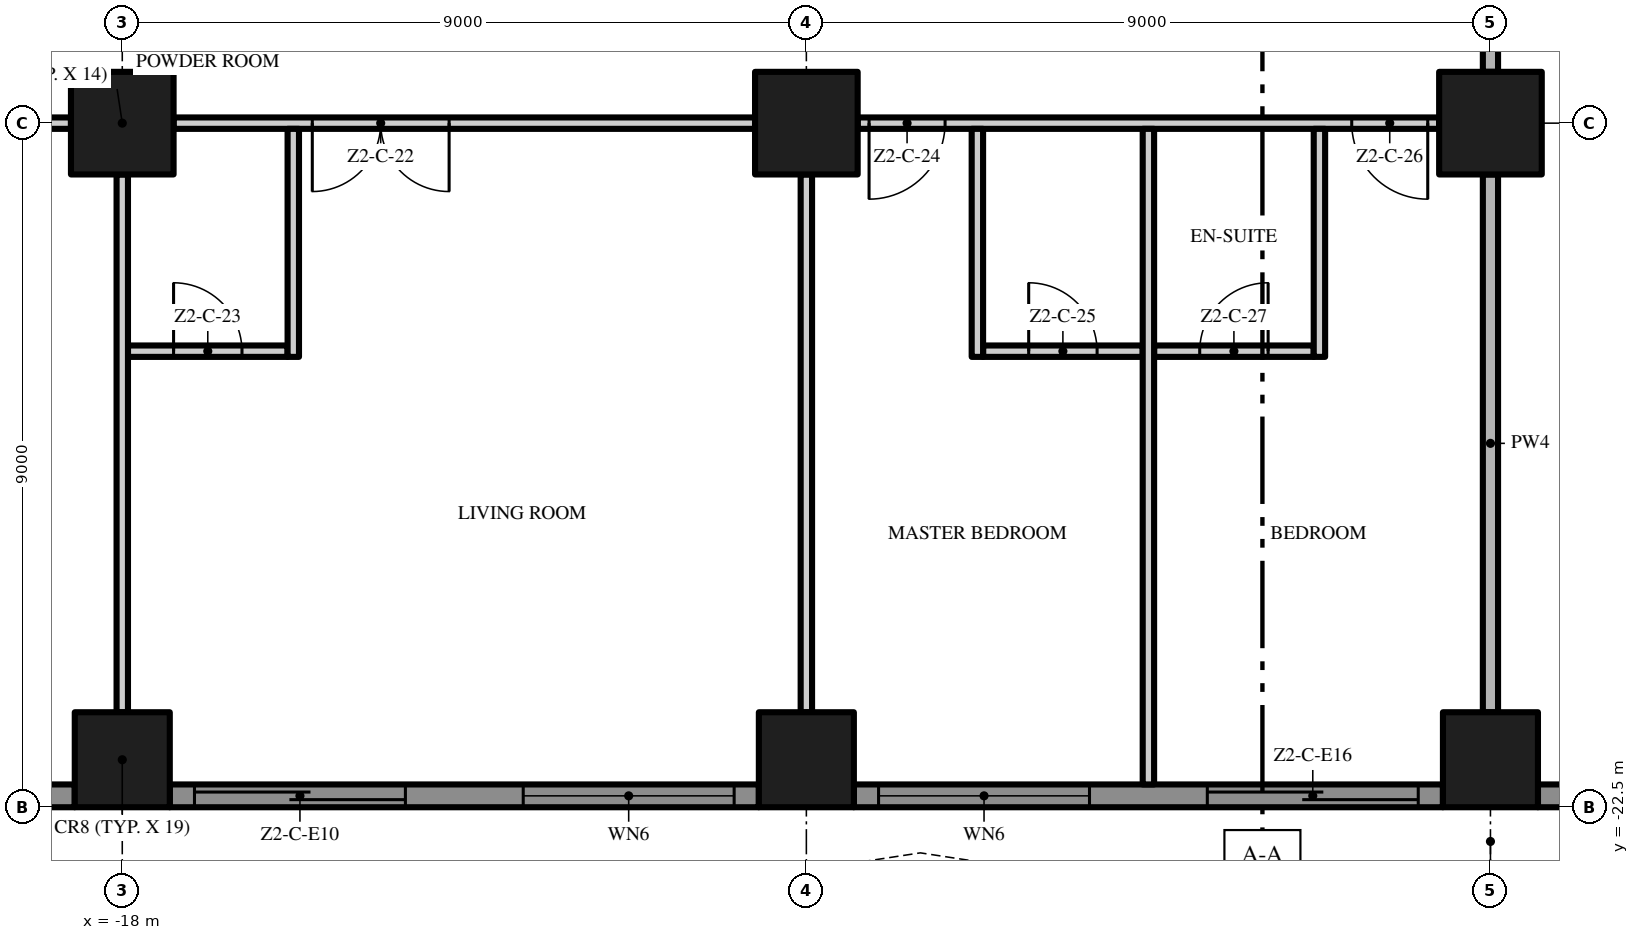
"""IFC4 building model, lengths in metres.
Left out: names, types, materials, properties, quantities, classifications, styles, units other than length and angle.
Written with IfcOpenShell. Run it as: python <this file> out.ifc"""

import sys

from ifc_helpers import new_model, si_unit, direction, frame, frame_2d, origin, origin_2d, place, context, subcontext, project, spatial, polyline, rectangle, outline, extrude, element, fill, save


model = new_model("IFC4")
c1 = context("Model", 3, precision=1e-05, world=origin(), true_north=direction((0.0, 1.0)))
c2 = subcontext(c1, "Body", "Model", "MODEL_VIEW")
j1 = project(units=[si_unit("LENGTHUNIT", "METRE"), si_unit("PLANEANGLEUNIT", "RADIAN")], contexts=[c1])
p1 = place(None, origin())
s1 = spatial("IfcSite", under=j1, at=p1, CompositionType="ELEMENT")
p2 = place(p1, origin())
s2 = spatial("IfcBuilding", under=s1, at=p2, CompositionType="ELEMENT")
p3 = place(p2, frame((0.0, 0.0, 99.8)))
s3 = spatial("IfcBuildingStorey", under=s2, at=p3, CompositionType="ELEMENT", Elevation=99.8)
p4 = place(p3, frame((-18.0, -13.5, 0.0), z_axis=(0.0, 0.0, 1.0), x_axis=(1.0, 0.0, 0.0)))
e1 = element("IfcColumn", 1, at=p4, inside=s3, PredefinedType="COLUMN", context=c2, shape_type="SweptSolid", body=[
    extrude(rectangle(XDim=1.35, YDim=1.35, at=origin_2d()), origin(), (0.0, 0.0, 1.0), 3.5),
])
p5 = place(p3, frame((-18.0, -21.875, 0.0), z_axis=(0.0, 0.0, 1.0), x_axis=(1.0, 0.0, 0.0)))
e2 = element("IfcColumn", 2, at=p5, inside=s3, PredefinedType="COLUMN", context=c2, shape_type="SweptSolid", body=[
    extrude(rectangle(XDim=1.25, YDim=1.25, at=origin_2d()), origin(), (0.0, 0.0, 1.0), 3.5),
])
p6 = place(p3, frame((-9.0, -13.5, 0.0), z_axis=(0.0, 0.0, 1.0), x_axis=(1.0, 0.0, 0.0)))
e3 = element("IfcColumn", 3, at=p6, inside=s3, PredefinedType="COLUMN", context=c2, shape_type="SweptSolid", body=[
    extrude(rectangle(XDim=1.35, YDim=1.35, at=origin_2d()), origin(), (0.0, 0.0, 1.0), 3.5),
])
p7 = place(p3, frame((-9.0, -21.875, 0.0), z_axis=(0.0, 0.0, 1.0), x_axis=(1.0, 0.0, 0.0)))
e4 = element("IfcColumn", 4, at=p7, inside=s3, PredefinedType="COLUMN", context=c2, shape_type="SweptSolid", body=[
    extrude(rectangle(XDim=1.25, YDim=1.25, at=origin_2d()), origin(), (0.0, 0.0, 1.0), 3.5),
])
p8 = place(p3, frame((0.0, -13.5, 0.0), z_axis=(0.0, 0.0, 1.0), x_axis=(1.0, 0.0, 0.0)))
e5 = element("IfcColumn", 5, at=p8, inside=s3, PredefinedType="COLUMN", context=c2, shape_type="SweptSolid", body=[
    extrude(rectangle(XDim=1.35, YDim=1.35, at=origin_2d()), origin(), (0.0, 0.0, 1.0), 3.5),
])
p9 = place(p3, frame((0.0, -21.875, 0.0), z_axis=(0.0, 0.0, 1.0), x_axis=(1.0, 0.0, 0.0)))
e6 = element("IfcColumn", 6, at=p9, inside=s3, PredefinedType="COLUMN", context=c2, shape_type="SweptSolid", body=[
    extrude(rectangle(XDim=1.25, YDim=1.25, at=origin_2d()), origin(), (0.0, 0.0, 1.0), 3.5),
])
p10 = place(p3, frame((-18.625, -22.35, 0.0), z_axis=(0.0, 0.0, 1.0), x_axis=(-1.0, 0.0, 0.0)))
e7 = element("IfcWall", 7, at=p10, inside=s3, PredefinedType="SOLIDWALL", context=c2, shape_type="SweptSolid", body=[
    extrude(rectangle(XDim=3.575, YDim=0.3, at=frame_2d((1.788, 0.0))), origin(), (0.0, 0.0, 1.0), 3.5),
])
p11 = place(p10, frame((0.325, 0.0, 0.45)))
e8 = element("IfcOpeningElement", 8, at=p11, cuts=e7, PredefinedType="OPENING", context=c2, shape_type="SweptSolid", body=[
    extrude(rectangle(XDim=2.775, YDim=2.65, at=frame_2d((1.387, 1.325))), frame((0.0, 0.16, 0.0), z_axis=(0.0, -1.0, 0.0), x_axis=(1.0, 0.0, 0.0)), (0.0, 0.0, 1.0), 0.32),
])
p12 = place(p3, frame((-9.625, -22.35, 0.0), z_axis=(0.0, 0.0, 1.0), x_axis=(-1.0, 0.0, 0.0)))
e9 = element("IfcWall", 9, at=p12, inside=s3, PredefinedType="SOLIDWALL", context=c2, shape_type="SweptSolid", body=[
    extrude(rectangle(XDim=7.75, YDim=0.3, at=frame_2d((3.875, 0.0))), origin(), (0.0, 0.0, 1.0), 3.5),
])
p13 = place(p12, frame((4.65, 0.0, 0.0)))
e10 = element("IfcOpeningElement", 10, at=p13, cuts=e9, PredefinedType="OPENING", context=c2, shape_type="SweptSolid", body=[
    extrude(rectangle(XDim=2.775, YDim=2.4, at=frame_2d((1.387, 1.2))), frame((0.0, 0.16, 0.0), z_axis=(0.0, -1.0, 0.0), x_axis=(1.0, 0.0, 0.0)), (0.0, 0.0, 1.0), 0.32),
])
p14 = place(p12, frame((0.325, 0.0, 0.45)))
e11 = element("IfcOpeningElement", 11, at=p14, cuts=e9, PredefinedType="OPENING", context=c2, shape_type="SweptSolid", body=[
    extrude(rectangle(XDim=2.775, YDim=2.65, at=frame_2d((1.387, 1.325))), frame((0.0, 0.16, 0.0), z_axis=(0.0, -1.0, 0.0), x_axis=(1.0, 0.0, 0.0)), (0.0, 0.0, 1.0), 0.32),
])
p15 = place(p3, frame((-0.625, -22.35, 0.0), z_axis=(0.0, 0.0, 1.0), x_axis=(-1.0, 0.0, 0.0)))
e12 = element("IfcWall", 12, at=p15, inside=s3, PredefinedType="SOLIDWALL", context=c2, shape_type="SweptSolid", body=[
    extrude(rectangle(XDim=7.75, YDim=0.3, at=frame_2d((3.875, 0.0))), origin(), (0.0, 0.0, 1.0), 3.5),
])
p16 = place(p15, frame((4.65, 0.0, 0.45)))
e13 = element("IfcOpeningElement", 13, at=p16, cuts=e12, PredefinedType="OPENING", context=c2, shape_type="SweptSolid", body=[
    extrude(rectangle(XDim=2.775, YDim=2.65, at=frame_2d((1.387, 1.325))), frame((0.0, 0.16, 0.0), z_axis=(0.0, -1.0, 0.0), x_axis=(1.0, 0.0, 0.0)), (0.0, 0.0, 1.0), 0.32),
])
p17 = place(p15, frame((0.325, 0.0, 0.0)))
e14 = element("IfcOpeningElement", 14, at=p17, cuts=e12, PredefinedType="OPENING", context=c2, shape_type="SweptSolid", body=[
    extrude(rectangle(XDim=2.775, YDim=2.4, at=frame_2d((1.387, 1.2))), frame((0.0, 0.16, 0.0), z_axis=(0.0, -1.0, 0.0), x_axis=(1.0, 0.0, 0.0)), (0.0, 0.0, 1.0), 0.32),
])
p18 = place(p3, frame((8.375, -22.35, 0.0), z_axis=(0.0, 0.0, 1.0), x_axis=(-1.0, 0.0, 0.0)))
e15 = element("IfcWall", 15, at=p18, inside=s3, PredefinedType="SOLIDWALL", context=c2, shape_type="SweptSolid", body=[
    extrude(rectangle(XDim=7.75, YDim=0.3, at=frame_2d((3.875, 0.0))), origin(), (0.0, 0.0, 1.0), 3.5),
])
p19 = place(p18, frame((4.65, 0.0, 0.0)))
e16 = element("IfcOpeningElement", 16, at=p19, cuts=e15, PredefinedType="OPENING", context=c2, shape_type="SweptSolid", body=[
    extrude(rectangle(XDim=2.775, YDim=2.4, at=frame_2d((1.387, 1.2))), frame((0.0, 0.16, 0.0), z_axis=(0.0, -1.0, 0.0), x_axis=(1.0, 0.0, 0.0)), (0.0, 0.0, 1.0), 0.32),
])
p20 = place(p18, frame((0.325, 0.0, 0.45)))
e17 = element("IfcOpeningElement", 17, at=p20, cuts=e15, PredefinedType="OPENING", context=c2, shape_type="SweptSolid", body=[
    extrude(rectangle(XDim=2.775, YDim=2.65, at=frame_2d((1.387, 1.325))), frame((0.0, 0.16, 0.0), z_axis=(0.0, -1.0, 0.0), x_axis=(1.0, 0.0, 0.0)), (0.0, 0.0, 1.0), 0.32),
])
p21 = place(p3, origin())
e18 = element("IfcWall", 18, at=p21, inside=s3, PredefinedType="USERDEFINED", context=c2, shape_type="SweptSolid", body=[
    extrude(outline(polyline([(-22.5, -23.1), (-21.0, -23.329), (-19.5, -23.929), (-18.0, -24.671), (-16.5, -25.271), (-15.0, -25.5), (-13.5, -25.271), (-12.0, -24.671), (-10.5, -23.929), (-9.0, -23.329), (-7.5, -23.1), (-6.0, -23.329), (-4.5, -23.929), (-3.0, -24.671), (-1.5, -25.271), (0.0, -25.5), (1.5, -25.271), (3.0, -24.671), (4.5, -23.929), (6.0, -23.329), (7.5, -23.1), (9.0, -23.329), (10.5, -23.929), (12.0, -24.671), (13.5, -25.271), (15.0, -25.5), (16.5, -25.271), (18.0, -24.671), (19.5, -23.929), (21.0, -23.329), (22.5, -23.1), (22.462, -22.853), (20.934, -23.086), (19.398, -23.701), (17.898, -24.442), (16.434, -25.028), (15.0, -25.247), (13.566, -25.028), (12.102, -24.442), (10.602, -23.701), (9.066, -23.086), (7.5, -22.847), (5.934, -23.086), (4.398, -23.701), (2.898, -24.442), (1.434, -25.028), (0.0, -25.247), (-1.434, -25.028), (-2.898, -24.442), (-4.398, -23.701), (-5.934, -23.086), (-7.5, -22.847), (-9.066, -23.086), (-10.602, -23.701), (-12.102, -24.442), (-13.566, -25.028), (-15.0, -25.247), (-16.434, -25.028), (-17.898, -24.442), (-19.398, -23.701), (-20.934, -23.086), (-22.462, -22.853), (-22.5, -23.1)])), origin(), (0.0, 0.0, 1.0), 0.9),
])
p22 = place(p3, frame((-17.925, -16.5, 0.0), z_axis=(0.0, 0.0, 1.0), x_axis=(1.0, 0.0, 0.0)))
e19 = element("IfcWall", 19, at=p22, inside=s3, PredefinedType="PARTITIONING", context=c2, shape_type="SweptSolid", body=[
    extrude(rectangle(XDim=2.1, YDim=0.15, at=frame_2d((1.05, 0.0))), origin(), (0.0, 0.0, 1.0), 3.5),
])
p23 = place(p22, frame((0.6, 0.0, 0.0)))
e20 = element("IfcOpeningElement", 20, at=p23, cuts=e19, PredefinedType="OPENING", context=c2, shape_type="SweptSolid", body=[
    extrude(rectangle(XDim=0.9, YDim=2.1, at=frame_2d((0.45, 1.05))), frame((0.0, 0.085, 0.0), z_axis=(0.0, -1.0, 0.0), x_axis=(1.0, 0.0, 0.0)), (0.0, 0.0, 1.0), 0.17),
])
p24 = place(p3, frame((-6.675, -16.5, 0.0), z_axis=(0.0, 0.0, 1.0), x_axis=(1.0, 0.0, 0.0)))
e21 = element("IfcWall", 21, at=p24, inside=s3, PredefinedType="PARTITIONING", context=c2, shape_type="SweptSolid", body=[
    extrude(rectangle(XDim=2.1, YDim=0.15, at=frame_2d((1.05, 0.0))), origin(), (0.0, 0.0, 1.0), 3.5),
])
p25 = place(p24, frame((0.6, 0.0, 0.0)))
e22 = element("IfcOpeningElement", 22, at=p25, cuts=e21, PredefinedType="OPENING", context=c2, shape_type="SweptSolid", body=[
    extrude(rectangle(XDim=0.9, YDim=2.1, at=frame_2d((0.45, 1.05))), frame((0.0, 0.085, 0.0), z_axis=(0.0, -1.0, 0.0), x_axis=(1.0, 0.0, 0.0)), (0.0, 0.0, 1.0), 0.17),
])
p26 = place(p3, frame((-4.425, -16.5, 0.0), z_axis=(0.0, 0.0, 1.0), x_axis=(1.0, 0.0, 0.0)))
e23 = element("IfcWall", 23, at=p26, inside=s3, PredefinedType="PARTITIONING", context=c2, shape_type="SweptSolid", body=[
    extrude(rectangle(XDim=2.1, YDim=0.15, at=frame_2d((1.05, 0.0))), origin(), (0.0, 0.0, 1.0), 3.5),
])
p27 = place(p26, frame((0.6, 0.0, 0.0)))
e24 = element("IfcOpeningElement", 24, at=p27, cuts=e23, PredefinedType="OPENING", context=c2, shape_type="SweptSolid", body=[
    extrude(rectangle(XDim=0.9, YDim=2.1, at=frame_2d((0.45, 1.05))), frame((0.0, 0.085, 0.0), z_axis=(0.0, -1.0, 0.0), x_axis=(1.0, 0.0, 0.0)), (0.0, 0.0, 1.0), 0.17),
])
p28 = place(p3, frame((-18.675, -13.5, 0.0), z_axis=(0.0, 0.0, 1.0), x_axis=(-1.0, 0.0, 0.0)))
e25 = element("IfcWall", 25, at=p28, inside=s3, PredefinedType="PARTITIONING", context=c2, shape_type="SweptSolid", body=[
    extrude(rectangle(XDim=7.075, YDim=0.15, at=frame_2d((3.538, 0.0))), origin(), (0.0, 0.0, 1.0), 3.5),
])
p29 = place(p28, frame((3.075, 0.0, 0.0)))
e26 = element("IfcOpeningElement", 26, at=p29, cuts=e25, PredefinedType="OPENING", context=c2, shape_type="SweptSolid", body=[
    extrude(rectangle(XDim=1.5, YDim=2.4, at=frame_2d((0.75, 1.2))), frame((0.0, 0.085, 0.0), z_axis=(0.0, -1.0, 0.0), x_axis=(1.0, 0.0, 0.0)), (0.0, 0.0, 1.0), 0.17),
])
p30 = place(p3, frame((-9.675, -13.5, 0.0), z_axis=(0.0, 0.0, 1.0), x_axis=(-1.0, 0.0, 0.0)))
e27 = element("IfcWall", 27, at=p30, inside=s3, PredefinedType="PARTITIONING", context=c2, shape_type="SweptSolid", body=[
    extrude(rectangle(XDim=7.65, YDim=0.15, at=frame_2d((3.825, 0.0))), origin(), (0.0, 0.0, 1.0), 3.5),
])
p31 = place(p30, frame((4.025, 0.0, 0.0)))
e28 = element("IfcOpeningElement", 28, at=p31, cuts=e27, PredefinedType="OPENING", context=c2, shape_type="SweptSolid", body=[
    extrude(rectangle(XDim=1.8, YDim=2.4, at=frame_2d((0.9, 1.2))), frame((0.0, 0.085, 0.0), z_axis=(0.0, -1.0, 0.0), x_axis=(1.0, 0.0, 0.0)), (0.0, 0.0, 1.0), 0.17),
])
p32 = place(p3, frame((-0.675, -13.5, 0.0), z_axis=(0.0, 0.0, 1.0), x_axis=(-1.0, 0.0, 0.0)))
e29 = element("IfcWall", 29, at=p32, inside=s3, PredefinedType="PARTITIONING", context=c2, shape_type="SweptSolid", body=[
    extrude(rectangle(XDim=7.65, YDim=0.15, at=frame_2d((3.825, 0.0))), origin(), (0.0, 0.0, 1.0), 3.5),
])
p33 = place(p32, frame((6.5, 0.0, 0.0)))
e30 = element("IfcOpeningElement", 30, at=p33, cuts=e29, PredefinedType="OPENING", context=c2, shape_type="SweptSolid", body=[
    extrude(rectangle(XDim=1.0, YDim=2.4, at=frame_2d((0.5, 1.2))), frame((0.0, 0.085, 0.0), z_axis=(0.0, -1.0, 0.0), x_axis=(1.0, 0.0, 0.0)), (0.0, 0.0, 1.0), 0.17),
])
p34 = place(p32, frame((0.15, 0.0, 0.0)))
e31 = element("IfcOpeningElement", 31, at=p34, cuts=e29, PredefinedType="OPENING", context=c2, shape_type="SweptSolid", body=[
    extrude(rectangle(XDim=1.0, YDim=2.4, at=frame_2d((0.5, 1.2))), frame((0.0, 0.085, 0.0), z_axis=(0.0, -1.0, 0.0), x_axis=(1.0, 0.0, 0.0)), (0.0, 0.0, 1.0), 0.17),
])
p35 = place(p3, frame((-18.0, -21.25, 0.0), z_axis=(0.0, 0.0, 1.0), x_axis=(0.0, 1.0, 0.0)))
e32 = element("IfcWall", 32, at=p35, inside=s3, PredefinedType="PARTITIONING", context=c2, shape_type="SweptSolid", body=[
    extrude(rectangle(XDim=7.075, YDim=0.15, at=frame_2d((3.538, 0.0))), origin(), (0.0, 0.0, 1.0), 3.5),
])
p36 = place(p3, frame((-15.75, -16.575, 0.0), z_axis=(0.0, 0.0, 1.0), x_axis=(0.0, 1.0, 0.0)))
e33 = element("IfcWall", 33, at=p36, inside=s3, PredefinedType="PARTITIONING", context=c2, shape_type="SweptSolid", body=[
    extrude(rectangle(XDim=3.0, YDim=0.15, at=frame_2d((1.5, 0.0))), origin(), (0.0, 0.0, 1.0), 3.5),
])
p37 = place(p3, frame((-9.0, -21.25, 0.0), z_axis=(0.0, 0.0, 1.0), x_axis=(0.0, 1.0, 0.0)))
e34 = element("IfcWall", 34, at=p37, inside=s3, PredefinedType="PARTITIONING", context=c2, shape_type="SweptSolid", body=[
    extrude(rectangle(XDim=7.075, YDim=0.15, at=frame_2d((3.538, 0.0))), origin(), (0.0, 0.0, 1.0), 3.5),
])
p38 = place(p3, frame((-6.75, -16.575, 0.0), z_axis=(0.0, 0.0, 1.0), x_axis=(0.0, 1.0, 0.0)))
e35 = element("IfcWall", 35, at=p38, inside=s3, PredefinedType="PARTITIONING", context=c2, shape_type="SweptSolid", body=[
    extrude(rectangle(XDim=3.0, YDim=0.15, at=frame_2d((1.5, 0.0))), origin(), (0.0, 0.0, 1.0), 3.5),
])
p39 = place(p3, frame((-4.5, -22.2, 0.0), z_axis=(0.0, 0.0, 1.0), x_axis=(0.0, 1.0, 0.0)))
e36 = element("IfcWall", 36, at=p39, inside=s3, PredefinedType="PARTITIONING", context=c2, shape_type="SweptSolid", body=[
    extrude(rectangle(XDim=8.625, YDim=0.15, at=frame_2d((4.312, 0.0))), origin(), (0.0, 0.0, 1.0), 3.5),
])
p40 = place(p3, frame((-2.25, -16.575, 0.0), z_axis=(0.0, 0.0, 1.0), x_axis=(0.0, 1.0, 0.0)))
e37 = element("IfcWall", 37, at=p40, inside=s3, PredefinedType="PARTITIONING", context=c2, shape_type="SweptSolid", body=[
    extrude(rectangle(XDim=3.0, YDim=0.15, at=frame_2d((1.5, 0.0))), origin(), (0.0, 0.0, 1.0), 3.5),
])
p41 = place(p3, frame((0.0, -21.25, 0.0), z_axis=(0.0, 0.0, 1.0), x_axis=(0.0, 1.0, 0.0)))
e38 = element("IfcWall", 38, at=p41, inside=s3, PredefinedType="PARTITIONING", context=c2, shape_type="SweptSolid", body=[
    extrude(rectangle(XDim=7.075, YDim=0.2, at=frame_2d((3.538, 0.0))), origin(), (0.0, 0.0, 1.0), 3.5),
])
p42 = place(p3, frame((0.0, -12.825, 0.0), z_axis=(0.0, 0.0, 1.0), x_axis=(0.0, 1.0, 0.0)))
e39 = element("IfcWall", 39, at=p42, inside=s3, PredefinedType="PARTITIONING", context=c2, shape_type="SweptSolid", body=[
    extrude(rectangle(XDim=7.65, YDim=0.2, at=frame_2d((3.825, 0.0))), origin(), (0.0, 0.0, 1.0), 3.5),
])
p43 = place(p13, origin())
e40 = element("IfcDoor", 40, at=p43, inside=s3, OperationType="SINGLE_SWING_LEFT", PredefinedType="DOOR", context=c2, shape_type="SweptSolid", body=[
    extrude(rectangle(XDim=2.775, YDim=2.4, at=frame_2d((1.387, 1.2))), frame((0.0, 0.025, 0.0), z_axis=(0.0, -1.0, 0.0), x_axis=(1.0, 0.0, 0.0)), (0.0, 0.0, 1.0), 0.05),
])
fill(e10, e40)
p44 = place(p14, origin())
e41 = element("IfcWindow", 41, at=p44, inside=s3, PartitioningType="SINGLE_PANEL", PredefinedType="WINDOW", context=c2, shape_type="SweptSolid", body=[
    extrude(rectangle(XDim=2.775, YDim=2.65, at=frame_2d((1.387, 1.325))), frame((0.0, 0.03, 0.0), z_axis=(0.0, -1.0, 0.0), x_axis=(1.0, 0.0, 0.0)), (0.0, 0.0, 1.0), 0.06),
])
fill(e11, e41)
p45 = place(p16, origin())
e42 = element("IfcWindow", 42, at=p45, inside=s3, PartitioningType="SINGLE_PANEL", PredefinedType="WINDOW", context=c2, shape_type="SweptSolid", body=[
    extrude(rectangle(XDim=2.775, YDim=2.65, at=frame_2d((1.387, 1.325))), frame((0.0, 0.03, 0.0), z_axis=(0.0, -1.0, 0.0), x_axis=(1.0, 0.0, 0.0)), (0.0, 0.0, 1.0), 0.06),
])
fill(e13, e42)
p46 = place(p17, origin())
e43 = element("IfcDoor", 43, at=p46, inside=s3, OperationType="SINGLE_SWING_LEFT", PredefinedType="DOOR", context=c2, shape_type="SweptSolid", body=[
    extrude(rectangle(XDim=2.775, YDim=2.4, at=frame_2d((1.387, 1.2))), frame((0.0, 0.025, 0.0), z_axis=(0.0, -1.0, 0.0), x_axis=(1.0, 0.0, 0.0)), (0.0, 0.0, 1.0), 0.05),
])
fill(e14, e43)
p47 = place(p31, origin())
e44 = element("IfcDoor", 44, at=p47, inside=s3, OperationType="DOUBLE_DOOR_SINGLE_SWING", PredefinedType="DOOR", context=c2, shape_type="SweptSolid", body=[
    extrude(rectangle(XDim=1.8, YDim=2.4, at=frame_2d((0.9, 1.2))), frame((0.0, 0.025, 0.0), z_axis=(0.0, -1.0, 0.0), x_axis=(1.0, 0.0, 0.0)), (0.0, 0.0, 1.0), 0.05),
])
fill(e28, e44)
p48 = place(p23, origin())
e45 = element("IfcDoor", 45, at=p48, inside=s3, OperationType="SINGLE_SWING_LEFT", PredefinedType="DOOR", context=c2, shape_type="SweptSolid", body=[
    extrude(rectangle(XDim=0.9, YDim=2.1, at=frame_2d((0.45, 1.05))), frame((0.0, 0.025, 0.0), z_axis=(0.0, -1.0, 0.0), x_axis=(1.0, 0.0, 0.0)), (0.0, 0.0, 1.0), 0.05),
])
fill(e20, e45)
p49 = place(p33, origin())
e46 = element("IfcDoor", 46, at=p49, inside=s3, OperationType="SINGLE_SWING_RIGHT", PredefinedType="DOOR", context=c2, shape_type="SweptSolid", body=[
    extrude(rectangle(XDim=1.0, YDim=2.4, at=frame_2d((0.5, 1.2))), frame((0.0, 0.025, 0.0), z_axis=(0.0, -1.0, 0.0), x_axis=(1.0, 0.0, 0.0)), (0.0, 0.0, 1.0), 0.05),
])
fill(e30, e46)
p50 = place(p25, origin())
e47 = element("IfcDoor", 47, at=p50, inside=s3, OperationType="SINGLE_SWING_LEFT", PredefinedType="DOOR", context=c2, shape_type="SweptSolid", body=[
    extrude(rectangle(XDim=0.9, YDim=2.1, at=frame_2d((0.45, 1.05))), frame((0.0, 0.025, 0.0), z_axis=(0.0, -1.0, 0.0), x_axis=(1.0, 0.0, 0.0)), (0.0, 0.0, 1.0), 0.05),
])
fill(e22, e47)
p51 = place(p34, origin())
e48 = element("IfcDoor", 48, at=p51, inside=s3, OperationType="SINGLE_SWING_LEFT", PredefinedType="DOOR", context=c2, shape_type="SweptSolid", body=[
    extrude(rectangle(XDim=1.0, YDim=2.4, at=frame_2d((0.5, 1.2))), frame((0.0, 0.025, 0.0), z_axis=(0.0, -1.0, 0.0), x_axis=(1.0, 0.0, 0.0)), (0.0, 0.0, 1.0), 0.05),
])
fill(e31, e48)
p52 = place(p27, origin())
e49 = element("IfcDoor", 49, at=p52, inside=s3, OperationType="SINGLE_SWING_RIGHT", PredefinedType="DOOR", context=c2, shape_type="SweptSolid", body=[
    extrude(rectangle(XDim=0.9, YDim=2.1, at=frame_2d((0.45, 1.05))), frame((0.0, 0.025, 0.0), z_axis=(0.0, -1.0, 0.0), x_axis=(1.0, 0.0, 0.0)), (0.0, 0.0, 1.0), 0.05),
])
fill(e24, e49)
save(model, sys.argv[1])
